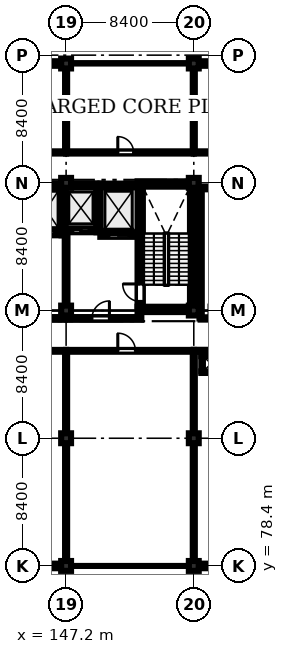
"""IFC4 building model, lengths in metres.
Left out: names, types, materials, properties, quantities, classifications, styles, units other than length and angle.
Written with IfcOpenShell. Run it as: python <this file> out.ifc"""

import sys

from ifc_helpers import new_model, si_unit, direction, frame, frame_2d, origin, origin_2d, place, context, subcontext, project, spatial, rectangle, extrude, element, fill, save


model = new_model("IFC4")
c1 = context("Model", 3, precision=1e-05, world=origin(), true_north=direction((0.0, 1.0)))
c2 = subcontext(c1, "Body", "Model", "MODEL_VIEW")
j1 = project(units=[si_unit("LENGTHUNIT", "METRE"), si_unit("PLANEANGLEUNIT", "RADIAN")], contexts=[c1])
p1 = place(None, origin())
s1 = spatial("IfcSite", under=j1, at=p1, CompositionType="ELEMENT")
p2 = place(p1, origin())
s2 = spatial("IfcBuilding", under=s1, at=p2, CompositionType="ELEMENT")
p3 = place(p2, frame((0.0, 0.0, 57.0)))
s3 = spatial("IfcBuildingStorey", under=s2, at=p3, CompositionType="ELEMENT", Elevation=57.0)
for number, where, z_axis, x_axis in (
    (1, (147.2, 78.4, 0.0), (0.0, 0.0, 1.0), (1.0, 0.0, 0.0)),
    (2, (147.2, 86.8, 0.0), (0.0, 0.0, 1.0), (1.0, 0.0, 0.0)),
    (3, (147.2, 95.2, 0.0), (0.0, 0.0, 1.0), (1.0, 0.0, 0.0)),
    (4, (147.2, 103.6, 0.0), (0.0, 0.0, 1.0), (1.0, 0.0, 0.0)),
    (5, (147.2, 111.45, 0.0), (0.0, 0.0, 1.0), (1.0, 0.0, 0.0)),
    (6, (155.6, 78.4, 0.0), (0.0, 0.0, 1.0), (1.0, 0.0, 0.0)),
    (7, (155.6, 86.8, 0.0), (0.0, 0.0, 1.0), (1.0, 0.0, 0.0)),
    (8, (155.6, 95.2, 0.0), (0.0, 0.0, 1.0), (1.0, 0.0, 0.0)),
    (9, (155.6, 103.6, 0.0), (0.0, 0.0, 1.0), (1.0, 0.0, 0.0)),
    (10, (155.6, 111.45, 0.0), (0.0, 0.0, 1.0), (1.0, 0.0, 0.0)),
):
    element("IfcColumn", number, at=place(p3, frame(where, z_axis=z_axis, x_axis=x_axis)), inside=s3, PredefinedType="COLUMN", context=c2, shape_type="SweptSolid", body=[
        extrude(rectangle(XDim=0.65, YDim=0.65, at=origin_2d()), origin(), (0.0, 0.0, 1.0), 4.02),
    ])
for number, where, z_axis, x_axis in (
    (11, (151.9, 95.275, 0.0), (0.0, 0.0, 1.0), (1.0, 0.0, 0.0)),
    (12, (151.9, 103.525, 0.0), (0.0, 0.0, 1.0), (1.0, 0.0, 0.0)),
):
    element("IfcWall", number, at=place(p3, frame(where, z_axis=z_axis, x_axis=x_axis)), inside=s3, PredefinedType="SHEAR", context=c2, shape_type="SweptSolid", body=[
        extrude(rectangle(XDim=3.8, YDim=0.35, at=frame_2d((1.9, 0.0))), origin(), (0.0, 0.0, 1.0), 4.02),
    ])
p4 = place(p3, frame((152.075, 95.45, 0.0), z_axis=(0.0, 0.0, 1.0), x_axis=(0.0, 1.0, 0.0)))
e13 = element("IfcWall", 13, at=p4, inside=s3, PredefinedType="SHEAR", context=c2, shape_type="SweptSolid", body=[
    extrude(rectangle(XDim=7.9, YDim=0.35, at=frame_2d((3.95, 0.0))), origin(), (0.0, 0.0, 1.0), 4.02),
])
p5 = place(p4, frame((0.35, 0.0, 0.0)))
e14 = element("IfcOpeningElement", 14, at=p5, cuts=e13, PredefinedType="OPENING", context=c2, shape_type="SweptSolid", body=[
    extrude(rectangle(XDim=1.15, YDim=2.15, at=frame_2d((0.575, 1.075))), frame((0.0, 0.185, 0.0), z_axis=(0.0, -1.0, 0.0), x_axis=(1.0, 0.0, 0.0)), (0.0, 0.0, 1.0), 0.37),
])
p6 = place(p3, frame((155.525, 95.45, 0.0), z_axis=(0.0, 0.0, 1.0), x_axis=(0.0, 1.0, 0.0)))
e15 = element("IfcWall", 15, at=p6, inside=s3, PredefinedType="SHEAR", context=c2, shape_type="SweptSolid", body=[
    extrude(rectangle(XDim=7.9, YDim=0.35, at=frame_2d((3.95, 0.0))), origin(), (0.0, 0.0, 1.0), 4.02),
])
p7 = place(p3, frame((144.85, 100.275, 0.0), z_axis=(0.0, 0.0, 1.0), x_axis=(1.0, 0.0, 0.0)))
e16 = element("IfcWall", 16, at=p7, inside=s3, PredefinedType="SHEAR", context=c2, shape_type="SweptSolid", body=[
    extrude(rectangle(XDim=2.05, YDim=0.25, at=frame_2d((1.025, 0.0))), origin(), (0.0, 0.0, 1.0), 4.02),
])
p8 = place(p7, frame((0.465, 0.0, 0.0)))
e17 = element("IfcOpeningElement", 17, at=p8, cuts=e16, PredefinedType="OPENING", context=c2, shape_type="SweptSolid", body=[
    extrude(rectangle(XDim=1.12, YDim=2.15, at=frame_2d((0.56, 1.075))), frame((0.0, 0.135, 0.0), z_axis=(0.0, -1.0, 0.0), x_axis=(1.0, 0.0, 0.0)), (0.0, 0.0, 1.0), 0.27),
])
p9 = place(p3, frame((144.85, 103.425, 0.0), z_axis=(0.0, 0.0, 1.0), x_axis=(1.0, 0.0, 0.0)))
e18 = element("IfcWall", 18, at=p9, inside=s3, PredefinedType="SHEAR", context=c2, shape_type="SweptSolid", body=[
    extrude(rectangle(XDim=2.05, YDim=0.25, at=frame_2d((1.025, 0.0))), origin(), (0.0, 0.0, 1.0), 4.02),
])
p10 = place(p3, frame((147.025, 100.15, 0.0), z_axis=(0.0, 0.0, 1.0), x_axis=(0.0, 1.0, 0.0)))
e19 = element("IfcWall", 19, at=p10, inside=s3, PredefinedType="SHEAR", context=c2, shape_type="SweptSolid", body=[
    extrude(rectangle(XDim=3.4, YDim=0.25, at=frame_2d((1.7, 0.0))), origin(), (0.0, 0.0, 1.0), 4.02),
])
p11 = place(p3, frame((147.15, 100.475, 0.0), z_axis=(0.0, 0.0, 1.0), x_axis=(1.0, 0.0, 0.0)))
e20 = element("IfcWall", 20, at=p11, inside=s3, PredefinedType="SHEAR", context=c2, shape_type="SweptSolid", body=[
    extrude(rectangle(XDim=2.05, YDim=0.25, at=frame_2d((1.025, 0.0))), origin(), (0.0, 0.0, 1.0), 4.02),
])
p12 = place(p11, frame((0.495, 0.0, 0.0)))
e21 = element("IfcOpeningElement", 21, at=p12, cuts=e20, PredefinedType="OPENING", context=c2, shape_type="SweptSolid", body=[
    extrude(rectangle(XDim=1.06, YDim=2.15, at=frame_2d((0.53, 1.075))), frame((0.0, 0.135, 0.0), z_axis=(0.0, -1.0, 0.0), x_axis=(1.0, 0.0, 0.0)), (0.0, 0.0, 1.0), 0.27),
])
p13 = place(p3, frame((147.15, 103.425, 0.0), z_axis=(0.0, 0.0, 1.0), x_axis=(1.0, 0.0, 0.0)))
e22 = element("IfcWall", 22, at=p13, inside=s3, PredefinedType="SHEAR", context=c2, shape_type="SweptSolid", body=[
    extrude(rectangle(XDim=2.05, YDim=0.25, at=frame_2d((1.025, 0.0))), origin(), (0.0, 0.0, 1.0), 4.02),
])
p14 = place(p3, frame((149.325, 100.35, 0.0), z_axis=(0.0, 0.0, 1.0), x_axis=(0.0, 1.0, 0.0)))
e23 = element("IfcWall", 23, at=p14, inside=s3, PredefinedType="SHEAR", context=c2, shape_type="SweptSolid", body=[
    extrude(rectangle(XDim=3.2, YDim=0.25, at=frame_2d((1.6, 0.0))), origin(), (0.0, 0.0, 1.0), 4.02),
])
p15 = place(p3, frame((149.45, 100.175, 0.0), z_axis=(0.0, 0.0, 1.0), x_axis=(1.0, 0.0, 0.0)))
e24 = element("IfcWall", 24, at=p15, inside=s3, PredefinedType="SHEAR", context=c2, shape_type="SweptSolid", body=[
    extrude(rectangle(XDim=2.45, YDim=0.25, at=frame_2d((1.225, 0.0))), origin(), (0.0, 0.0, 1.0), 4.02),
])
p16 = place(p15, frame((0.575, 0.0, 0.0)))
e25 = element("IfcOpeningElement", 25, at=p16, cuts=e24, PredefinedType="OPENING", context=c2, shape_type="SweptSolid", body=[
    extrude(rectangle(XDim=1.3, YDim=2.25, at=frame_2d((0.65, 1.125))), frame((0.0, 0.135, 0.0), z_axis=(0.0, -1.0, 0.0), x_axis=(1.0, 0.0, 0.0)), (0.0, 0.0, 1.0), 0.27),
])
p17 = place(p3, frame((149.45, 103.425, 0.0), z_axis=(0.0, 0.0, 1.0), x_axis=(1.0, 0.0, 0.0)))
e26 = element("IfcWall", 26, at=p17, inside=s3, PredefinedType="SHEAR", context=c2, shape_type="SweptSolid", body=[
    extrude(rectangle(XDim=2.45, YDim=0.25, at=frame_2d((1.225, 0.0))), origin(), (0.0, 0.0, 1.0), 4.02),
])
p18 = place(p3, frame((139.125, 111.45, 0.0), z_axis=(0.0, 0.0, 1.0), x_axis=(1.0, 0.0, 0.0)))
e27 = element("IfcWall", 27, at=p18, inside=s3, PredefinedType="STANDARD", context=c2, shape_type="SweptSolid", body=[
    extrude(rectangle(XDim=7.75, YDim=0.3, at=frame_2d((3.875, 0.0))), origin(), (0.0, 0.0, 1.0), 3.32),
])
p19 = place(p18, frame((0.85, 0.0, 0.9)))
e28 = element("IfcOpeningElement", 28, at=p19, cuts=e27, PredefinedType="OPENING", context=c2, shape_type="SweptSolid", body=[
    extrude(rectangle(XDim=1.9, YDim=2.1, at=frame_2d((0.95, 1.05))), frame((0.0, 0.16, 0.0), z_axis=(0.0, -1.0, 0.0), x_axis=(1.0, 0.0, 0.0)), (0.0, 0.0, 1.0), 0.32),
])
p20 = place(p18, frame((4.65, 0.0, 0.9)))
e29 = element("IfcOpeningElement", 29, at=p20, cuts=e27, PredefinedType="OPENING", context=c2, shape_type="SweptSolid", body=[
    extrude(rectangle(XDim=1.9, YDim=2.1, at=frame_2d((0.95, 1.05))), frame((0.0, 0.16, 0.0), z_axis=(0.0, -1.0, 0.0), x_axis=(1.0, 0.0, 0.0)), (0.0, 0.0, 1.0), 0.32),
])
p21 = place(p3, frame((155.925, 111.45, 0.0), z_axis=(0.0, 0.0, 1.0), x_axis=(1.0, 0.0, 0.0)))
e30 = element("IfcWall", 30, at=p21, inside=s3, PredefinedType="STANDARD", context=c2, shape_type="SweptSolid", body=[
    extrude(rectangle(XDim=7.2, YDim=0.3, at=frame_2d((3.6, 0.0))), origin(), (0.0, 0.0, 1.0), 3.32),
])
p22 = place(p21, frame((0.85, 0.0, 0.9)))
e31 = element("IfcOpeningElement", 31, at=p22, cuts=e30, PredefinedType="OPENING", context=c2, shape_type="SweptSolid", body=[
    extrude(rectangle(XDim=1.9, YDim=2.1, at=frame_2d((0.95, 1.05))), frame((0.0, 0.16, 0.0), z_axis=(0.0, -1.0, 0.0), x_axis=(1.0, 0.0, 0.0)), (0.0, 0.0, 1.0), 0.32),
])
p23 = place(p21, frame((4.65, 0.0, 0.9)))
e32 = element("IfcOpeningElement", 32, at=p23, cuts=e30, PredefinedType="OPENING", context=c2, shape_type="SweptSolid", body=[
    extrude(rectangle(XDim=1.9, YDim=2.1, at=frame_2d((0.95, 1.05))), frame((0.0, 0.16, 0.0), z_axis=(0.0, -1.0, 0.0), x_axis=(1.0, 0.0, 0.0)), (0.0, 0.0, 1.0), 0.32),
])
p24 = place(p3, frame((146.875, 78.4, 0.0), z_axis=(0.0, 0.0, 1.0), x_axis=(-1.0, 0.0, 0.0)))
e33 = element("IfcWall", 33, at=p24, inside=s3, PredefinedType="STANDARD", context=c2, shape_type="SweptSolid", body=[
    extrude(rectangle(XDim=7.75, YDim=0.3, at=frame_2d((3.875, 0.0))), origin(), (0.0, 0.0, 1.0), 3.32),
])
p25 = place(p24, frame((1.15, 0.0, 0.95)))
e34 = element("IfcOpeningElement", 34, at=p25, cuts=e33, PredefinedType="OPENING", context=c2, shape_type="SweptSolid", body=[
    extrude(rectangle(XDim=1.75, YDim=1.85, at=frame_2d((0.875, 0.925))), frame((0.0, 0.16, 0.0), z_axis=(0.0, -1.0, 0.0), x_axis=(1.0, 0.0, 0.0)), (0.0, 0.0, 1.0), 0.32),
])
p26 = place(p3, frame((163.125, 78.4, 0.0), z_axis=(0.0, 0.0, 1.0), x_axis=(-1.0, 0.0, 0.0)))
e35 = element("IfcWall", 35, at=p26, inside=s3, PredefinedType="STANDARD", context=c2, shape_type="SweptSolid", body=[
    extrude(rectangle(XDim=7.2, YDim=0.3, at=frame_2d((3.6, 0.0))), origin(), (0.0, 0.0, 1.0), 3.32),
])
p27 = place(p26, frame((1.15, 0.0, 0.95)))
e36 = element("IfcOpeningElement", 36, at=p27, cuts=e35, PredefinedType="OPENING", context=c2, shape_type="SweptSolid", body=[
    extrude(rectangle(XDim=1.75, YDim=1.85, at=frame_2d((0.875, 0.925))), frame((0.0, 0.16, 0.0), z_axis=(0.0, -1.0, 0.0), x_axis=(1.0, 0.0, 0.0)), (0.0, 0.0, 1.0), 0.32),
])
p28 = place(p3, frame((142.3, 94.68, 0.0), z_axis=(0.0, 0.0, 1.0), x_axis=(1.0, 0.0, 0.0)))
e37 = element("IfcWall", 37, at=p28, inside=s3, PredefinedType="STANDARD", context=c2, shape_type="SweptSolid", body=[
    extrude(rectangle(XDim=4.8, YDim=0.18, at=frame_2d((2.4, 0.0))), origin(), (0.0, 0.0, 1.0), 4.02),
])
p29 = place(p28, frame((1.6, 0.0, 0.0)))
e38 = element("IfcOpeningElement", 38, at=p29, cuts=e37, PredefinedType="OPENING", context=c2, shape_type="SweptSolid", body=[
    extrude(rectangle(XDim=1.15, YDim=2.15, at=frame_2d((0.575, 1.075))), frame((0.0, 0.1, 0.0), z_axis=(0.0, -1.0, 0.0), x_axis=(1.0, 0.0, 0.0)), (0.0, 0.0, 1.0), 0.2),
])
p30 = place(p3, frame((147.3, 94.68, 0.0), z_axis=(0.0, 0.0, 1.0), x_axis=(1.0, 0.0, 0.0)))
e39 = element("IfcWall", 39, at=p30, inside=s3, PredefinedType="STANDARD", context=c2, shape_type="SweptSolid", body=[
    extrude(rectangle(XDim=4.85, YDim=0.18, at=frame_2d((2.425, 0.0))), origin(), (0.0, 0.0, 1.0), 4.02),
])
p31 = place(p30, frame((1.6, 0.0, 0.0)))
e40 = element("IfcOpeningElement", 40, at=p31, cuts=e39, PredefinedType="OPENING", context=c2, shape_type="SweptSolid", body=[
    extrude(rectangle(XDim=1.15, YDim=2.15, at=frame_2d((0.575, 1.075))), frame((0.0, 0.1, 0.0), z_axis=(0.0, -1.0, 0.0), x_axis=(1.0, 0.0, 0.0)), (0.0, 0.0, 1.0), 0.2),
])
p32 = place(p3, frame((147.2, 95.75, 0.0), z_axis=(0.0, 0.0, 1.0), x_axis=(0.0, 1.0, 0.0)))
e41 = element("IfcWall", 41, at=p32, inside=s3, PredefinedType="STANDARD", context=c2, shape_type="SweptSolid", body=[
    extrude(rectangle(XDim=4.5, YDim=0.18, at=frame_2d((2.25, 0.0))), origin(), (0.0, 0.0, 1.0), 3.32),
])
p33 = place(p3, frame((156.05, 94.68, 0.0), z_axis=(0.0, 0.0, 1.0), x_axis=(1.0, 0.0, 0.0)))
e42 = element("IfcWall", 42, at=p33, inside=s3, PredefinedType="PARTITIONING", context=c2, shape_type="SweptSolid", body=[
    extrude(rectangle(XDim=7.15, YDim=0.15, at=frame_2d((3.575, 0.0))), origin(), (0.0, 0.0, 1.0), 4.02),
])
p34 = place(p33, frame((0.55, 0.0, 0.0)))
e43 = element("IfcOpeningElement", 43, at=p34, cuts=e42, PredefinedType="OPENING", context=c2, shape_type="SweptSolid", body=[
    extrude(rectangle(XDim=0.98, YDim=2.12, at=frame_2d((0.49, 1.06))), frame((0.0, 0.085, 0.0), z_axis=(0.0, -1.0, 0.0), x_axis=(1.0, 0.0, 0.0)), (0.0, 0.0, 1.0), 0.17),
])
p35 = place(p3, frame((156.05, 103.25, 0.0), z_axis=(0.0, 0.0, 1.0), x_axis=(1.0, 0.0, 0.0)))
e44 = element("IfcWall", 44, at=p35, inside=s3, PredefinedType="PARTITIONING", context=c2, shape_type="SweptSolid", body=[
    extrude(rectangle(XDim=7.15, YDim=0.15, at=frame_2d((3.575, 0.0))), origin(), (0.0, 0.0, 1.0), 4.02),
])
p36 = place(p3, frame((156.05, 94.68, 0.0), z_axis=(0.0, 0.0, 1.0), x_axis=(0.0, 1.0, 0.0)))
e45 = element("IfcWall", 45, at=p36, inside=s3, PredefinedType="PARTITIONING", context=c2, shape_type="SweptSolid", body=[
    extrude(rectangle(XDim=8.57, YDim=0.15, at=frame_2d((4.285, 0.0))), origin(), (0.0, 0.0, 1.0), 4.02),
])
p37 = place(p3, frame((134.6, 105.6, 0.0), z_axis=(0.0, 0.0, 1.0), x_axis=(1.0, 0.0, 0.0)))
e46 = element("IfcWall", 46, at=p37, inside=s3, PredefinedType="PARTITIONING", context=c2, shape_type="SweptSolid", body=[
    extrude(rectangle(XDim=12.6, YDim=0.145, at=frame_2d((6.3, 0.0))), origin(), (0.0, 0.0, 1.0), 4.02),
])
p38 = place(p37, frame((6.8, 0.0, 0.0)))
e47 = element("IfcOpeningElement", 47, at=p38, cuts=e46, PredefinedType="OPENING", context=c2, shape_type="SweptSolid", body=[
    extrude(rectangle(XDim=1.16, YDim=2.2, at=frame_2d((0.58, 1.1))), frame((0.0, 0.083, 0.0), z_axis=(0.0, -1.0, 0.0), x_axis=(1.0, 0.0, 0.0)), (0.0, 0.0, 1.0), 0.165),
])
p39 = place(p3, frame((147.2, 105.6, 0.0), z_axis=(0.0, 0.0, 1.0), x_axis=(1.0, 0.0, 0.0)))
e48 = element("IfcWall", 48, at=p39, inside=s3, PredefinedType="PARTITIONING", context=c2, shape_type="SweptSolid", body=[
    extrude(rectangle(XDim=8.4, YDim=0.145, at=frame_2d((4.2, 0.0))), origin(), (0.0, 0.0, 1.0), 4.02),
])
p40 = place(p39, frame((3.4, 0.0, 0.0)))
e49 = element("IfcOpeningElement", 49, at=p40, cuts=e48, PredefinedType="OPENING", context=c2, shape_type="SweptSolid", body=[
    extrude(rectangle(XDim=1.04, YDim=2.16, at=frame_2d((0.52, 1.08))), frame((0.0, 0.083, 0.0), z_axis=(0.0, -1.0, 0.0), x_axis=(1.0, 0.0, 0.0)), (0.0, 0.0, 1.0), 0.165),
])
p41 = place(p3, frame((147.2, 105.6, 0.0), z_axis=(0.0, 0.0, 1.0), x_axis=(0.0, 1.0, 0.0)))
e50 = element("IfcWall", 50, at=p41, inside=s3, PredefinedType="PARTITIONING", context=c2, shape_type="SweptSolid", body=[
    extrude(rectangle(XDim=5.75, YDim=0.135, at=frame_2d((2.875, 0.0))), origin(), (0.0, 0.0, 1.0), 3.32),
])
p42 = place(p3, frame((155.6, 105.6, 0.0), z_axis=(0.0, 0.0, 1.0), x_axis=(1.0, 0.0, 0.0)))
e51 = element("IfcWall", 51, at=p42, inside=s3, PredefinedType="PARTITIONING", context=c2, shape_type="SweptSolid", body=[
    extrude(rectangle(XDim=7.75, YDim=0.145, at=frame_2d((3.875, 0.0))), origin(), (0.0, 0.0, 1.0), 4.02),
])
p43 = place(p42, frame((3.4, 0.0, 0.0)))
e52 = element("IfcOpeningElement", 52, at=p43, cuts=e51, PredefinedType="OPENING", context=c2, shape_type="SweptSolid", body=[
    extrude(rectangle(XDim=1.16, YDim=2.2, at=frame_2d((0.58, 1.1))), frame((0.0, 0.083, 0.0), z_axis=(0.0, -1.0, 0.0), x_axis=(1.0, 0.0, 0.0)), (0.0, 0.0, 1.0), 0.165),
])
p44 = place(p3, frame((155.6, 105.6, 0.0), z_axis=(0.0, 0.0, 1.0), x_axis=(0.0, 1.0, 0.0)))
e53 = element("IfcWall", 53, at=p44, inside=s3, PredefinedType="PARTITIONING", context=c2, shape_type="SweptSolid", body=[
    extrude(rectangle(XDim=5.75, YDim=0.135, at=frame_2d((2.875, 0.0))), origin(), (0.0, 0.0, 1.0), 3.32),
])
p45 = place(p3, frame((138.95, 92.55, 0.0), z_axis=(0.0, 0.0, 1.0), x_axis=(1.0, 0.0, 0.0)))
e54 = element("IfcWall", 54, at=p45, inside=s3, PredefinedType="PARTITIONING", context=c2, shape_type="SweptSolid", body=[
    extrude(rectangle(XDim=8.25, YDim=0.12, at=frame_2d((4.125, 0.0))), origin(), (0.0, 0.0, 1.0), 4.02),
])
p46 = place(p45, frame((3.65, 0.0, 0.0)))
e55 = element("IfcOpeningElement", 55, at=p46, cuts=e54, PredefinedType="OPENING", context=c2, shape_type="SweptSolid", body=[
    extrude(rectangle(XDim=1.16, YDim=2.2, at=frame_2d((0.58, 1.1))), frame((0.0, 0.07, 0.0), z_axis=(0.0, -1.0, 0.0), x_axis=(1.0, 0.0, 0.0)), (0.0, 0.0, 1.0), 0.14),
])
p47 = place(p3, frame((147.2, 92.55, 0.0), z_axis=(0.0, 0.0, 1.0), x_axis=(1.0, 0.0, 0.0)))
e56 = element("IfcWall", 56, at=p47, inside=s3, PredefinedType="PARTITIONING", context=c2, shape_type="SweptSolid", body=[
    extrude(rectangle(XDim=8.4, YDim=0.12, at=frame_2d((4.2, 0.0))), origin(), (0.0, 0.0, 1.0), 4.02),
])
p48 = place(p47, frame((3.4, 0.0, 0.0)))
e57 = element("IfcOpeningElement", 57, at=p48, cuts=e56, PredefinedType="OPENING", context=c2, shape_type="SweptSolid", body=[
    extrude(rectangle(XDim=1.16, YDim=2.2, at=frame_2d((0.58, 1.1))), frame((0.0, 0.07, 0.0), z_axis=(0.0, -1.0, 0.0), x_axis=(1.0, 0.0, 0.0)), (0.0, 0.0, 1.0), 0.14),
])
p49 = place(p3, frame((147.2, 78.55, 0.0), z_axis=(0.0, 0.0, 1.0), x_axis=(0.0, 1.0, 0.0)))
e58 = element("IfcWall", 58, at=p49, inside=s3, PredefinedType="PARTITIONING", context=c2, shape_type="SweptSolid", body=[
    extrude(rectangle(XDim=14.0, YDim=0.135, at=frame_2d((7.0, 0.0))), origin(), (0.0, 0.0, 1.0), 3.32),
])
p50 = place(p3, frame((155.6, 92.55, 0.0), z_axis=(0.0, 0.0, 1.0), x_axis=(1.0, 0.0, 0.0)))
e59 = element("IfcWall", 59, at=p50, inside=s3, PredefinedType="PARTITIONING", context=c2, shape_type="SweptSolid", body=[
    extrude(rectangle(XDim=7.75, YDim=0.135, at=frame_2d((3.875, 0.0))), origin(), (0.0, 0.0, 1.0), 4.02),
])
p51 = place(p50, frame((3.4, 0.0, 0.0)))
e60 = element("IfcOpeningElement", 60, at=p51, cuts=e59, PredefinedType="OPENING", context=c2, shape_type="SweptSolid", body=[
    extrude(rectangle(XDim=1.16, YDim=2.2, at=frame_2d((0.58, 1.1))), frame((0.0, 0.077, 0.0), z_axis=(0.0, -1.0, 0.0), x_axis=(1.0, 0.0, 0.0)), (0.0, 0.0, 1.0), 0.155),
])
p52 = place(p3, frame((155.6, 78.55, 0.0), z_axis=(0.0, 0.0, 1.0), x_axis=(0.0, 1.0, 0.0)))
e61 = element("IfcWall", 61, at=p52, inside=s3, PredefinedType="PARTITIONING", context=c2, shape_type="SweptSolid", body=[
    extrude(rectangle(XDim=14.0, YDim=0.135, at=frame_2d((7.0, 0.0))), origin(), (0.0, 0.0, 1.0), 3.32),
])
for number, where, z_axis, x_axis in (
    (62, (156.095, 91.147, 0.0), (0.0, 0.0, 1.0), (1.0, 0.0, 0.0)),
    (63, (156.095, 92.252, 0.0), (0.0, 0.0, 1.0), (1.0, 0.0, 0.0)),
):
    element("IfcWall", number, at=place(p3, frame(where, z_axis=z_axis, x_axis=x_axis)), inside=s3, PredefinedType="PARTITIONING", context=c2, shape_type="SweptSolid", body=[
        extrude(rectangle(XDim=1.31, YDim=0.105, at=frame_2d((0.655, 0.0))), origin(), (0.0, 0.0, 1.0), 4.02),
    ])
p53 = place(p3, frame((156.147, 91.2, 0.0), z_axis=(0.0, 0.0, 1.0), x_axis=(0.0, 1.0, 0.0)))
e64 = element("IfcWall", 64, at=p53, inside=s3, PredefinedType="PARTITIONING", context=c2, shape_type="SweptSolid", body=[
    extrude(rectangle(XDim=1.0, YDim=0.105, at=frame_2d((0.5, 0.0))), origin(), (0.0, 0.0, 1.0), 4.02),
])
p54 = place(p31, origin())
e65 = element("IfcDoor", 65, at=p54, inside=s3, OperationType="SINGLE_SWING_RIGHT", PredefinedType="DOOR", context=c2, shape_type="SweptSolid", body=[
    extrude(rectangle(XDim=1.15, YDim=2.15, at=frame_2d((0.575, 1.075))), frame((0.0, 0.025, 0.0), z_axis=(0.0, -1.0, 0.0), x_axis=(1.0, 0.0, 0.0)), (0.0, 0.0, 1.0), 0.05),
])
fill(e40, e65)
p55 = place(p40, origin())
e66 = element("IfcDoor", 66, at=p55, inside=s3, OperationType="SINGLE_SWING_LEFT", PredefinedType="DOOR", context=c2, shape_type="SweptSolid", body=[
    extrude(rectangle(XDim=1.04, YDim=2.16, at=frame_2d((0.52, 1.08))), frame((0.0, 0.025, 0.0), z_axis=(0.0, -1.0, 0.0), x_axis=(1.0, 0.0, 0.0)), (0.0, 0.0, 1.0), 0.05),
])
fill(e49, e66)
p56 = place(p48, origin())
e67 = element("IfcDoor", 67, at=p56, inside=s3, OperationType="SINGLE_SWING_LEFT", PredefinedType="DOOR", context=c2, shape_type="SweptSolid", body=[
    extrude(rectangle(XDim=1.16, YDim=2.2, at=frame_2d((0.58, 1.1))), frame((0.0, 0.025, 0.0), z_axis=(0.0, -1.0, 0.0), x_axis=(1.0, 0.0, 0.0)), (0.0, 0.0, 1.0), 0.05),
])
fill(e57, e67)
p57 = place(p5, origin())
e68 = element("IfcDoor", 68, at=p57, inside=s3, OperationType="SINGLE_SWING_RIGHT", PredefinedType="DOOR", context=c2, shape_type="SweptSolid", body=[
    extrude(rectangle(XDim=1.15, YDim=2.15, at=frame_2d((0.575, 1.075))), frame((0.0, 0.025, 0.0), z_axis=(0.0, -1.0, 0.0), x_axis=(1.0, 0.0, 0.0)), (0.0, 0.0, 1.0), 0.05),
])
fill(e14, e68)
p58 = place(p8, origin())
e69 = element("IfcDoor", 69, at=p58, inside=s3, OperationType="SLIDING_TO_LEFT", PredefinedType="DOOR", context=c2, shape_type="SweptSolid", body=[
    extrude(rectangle(XDim=1.12, YDim=2.15, at=frame_2d((0.56, 1.075))), frame((0.0, 0.025, 0.0), z_axis=(0.0, -1.0, 0.0), x_axis=(1.0, 0.0, 0.0)), (0.0, 0.0, 1.0), 0.05),
])
fill(e17, e69)
p59 = place(p12, origin())
e70 = element("IfcDoor", 70, at=p59, inside=s3, OperationType="SLIDING_TO_LEFT", PredefinedType="DOOR", context=c2, shape_type="SweptSolid", body=[
    extrude(rectangle(XDim=1.06, YDim=2.15, at=frame_2d((0.53, 1.075))), frame((0.0, 0.025, 0.0), z_axis=(0.0, -1.0, 0.0), x_axis=(1.0, 0.0, 0.0)), (0.0, 0.0, 1.0), 0.05),
])
fill(e21, e70)
p60 = place(p16, origin())
e71 = element("IfcDoor", 71, at=p60, inside=s3, OperationType="SLIDING_TO_LEFT", PredefinedType="DOOR", context=c2, shape_type="SweptSolid", body=[
    extrude(rectangle(XDim=1.3, YDim=2.25, at=frame_2d((0.65, 1.125))), frame((0.0, 0.025, 0.0), z_axis=(0.0, -1.0, 0.0), x_axis=(1.0, 0.0, 0.0)), (0.0, 0.0, 1.0), 0.05),
])
fill(e25, e71)
save(model, sys.argv[1])
